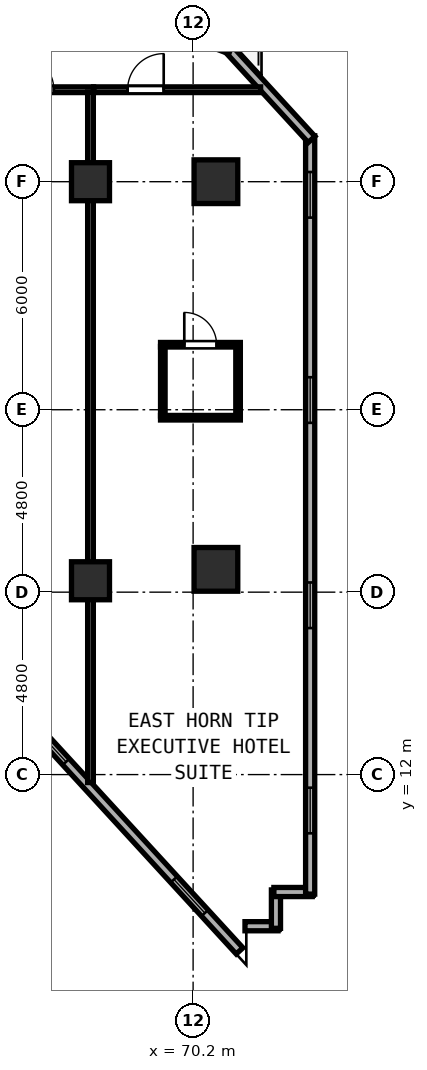
"""IFC4 building model, lengths in metres.
Left out: names, types, materials, properties, quantities, classifications, styles, units other than length and angle.
Written with IfcOpenShell. Run it as: python <this file> out.ifc"""

import sys

from ifc_helpers import new_model, si_unit, direction, frame, frame_2d, origin, origin_2d, place, context, subcontext, project, spatial, rectangle, hollow_rectangle, extrude, element, fill, save


model = new_model("IFC4")
c1 = context("Model", 3, precision=1e-05, world=origin(), true_north=direction((0.0, 1.0)))
c2 = subcontext(c1, "Body", "Model", "MODEL_VIEW")
j1 = project(units=[si_unit("LENGTHUNIT", "METRE"), si_unit("PLANEANGLEUNIT", "RADIAN")], contexts=[c1])
p1 = place(None, origin())
s1 = spatial("IfcSite", under=j1, at=p1, CompositionType="ELEMENT")
p2 = place(p1, origin())
s2 = spatial("IfcBuilding", under=s1, at=p2, CompositionType="ELEMENT")
p3 = place(p2, frame((0.0, 0.0, 24.0)))
s3 = spatial("IfcBuildingStorey", under=s2, at=p3, CompositionType="ELEMENT", Elevation=24.0)
for number, where, z_axis, x_axis in (
    (1, (70.8, 17.4, 0.0), (0.0, 0.0, 1.0), (1.0, 0.0, 0.0)),
    (2, (70.8, 27.6, 0.0), (0.0, 0.0, 1.0), (1.0, 0.0, 0.0)),
):
    element("IfcColumn", number, at=place(p3, frame(where, z_axis=z_axis, x_axis=x_axis)), inside=s3, PredefinedType="COLUMN", context=c2, shape_type="SweptSolid", body=[
        extrude(hollow_rectangle(XDim=1.15, YDim=1.15, WallThickness=0.042, at=origin_2d()), origin(), (0.0, 0.0, 1.0), 3.8),
    ])
for number, where, z_axis, x_axis in (
    (3, (67.5, 17.1, -0.26), (0.0, 0.0, 1.0), (1.0, 0.0, 0.0)),
    (4, (67.5, 27.6, -0.26), (0.0, 0.0, 1.0), (1.0, 0.0, 0.0)),
):
    element("IfcColumn", number, at=place(p3, frame(where, z_axis=z_axis, x_axis=x_axis)), inside=s3, PredefinedType="COLUMN", context=c2, shape_type="SweptSolid", body=[
        extrude(hollow_rectangle(XDim=1.0, YDim=1.0, WallThickness=0.038, at=origin_2d()), origin(), (0.0, 0.0, 1.0), 4.06),
    ])
p4 = place(p3, frame((64.964, 14.399, 0.0), z_axis=(0.0, 0.0, 1.0), x_axis=(0.676144639244, -0.736768910054, 0.0)))
e5 = element("IfcWall", 5, at=p4, inside=s3, PredefinedType="SOLIDWALL", context=c2, shape_type="SweptSolid", body=[
    extrude(rectangle(XDim=9.552, YDim=0.24, at=frame_2d((4.776, 0.0))), origin(), (0.0, 0.0, 1.0), 3.6),
])
p5 = place(p4, frame((1.6, 0.0, 0.85)))
e6 = element("IfcOpeningElement", 6, at=p5, cuts=e5, PredefinedType="OPENING", context=c2, shape_type="SweptSolid", body=[
    extrude(rectangle(XDim=1.2, YDim=1.85, at=frame_2d((0.6, 0.925))), frame((0.0, 0.13, 0.0), z_axis=(0.0, -1.0, 0.0), x_axis=(1.0, 0.0, 0.0)), (0.0, 0.0, 1.0), 0.26),
])
p6 = place(p4, frame((7.0, 0.0, 0.85)))
e7 = element("IfcOpeningElement", 7, at=p6, cuts=e5, PredefinedType="OPENING", context=c2, shape_type="SweptSolid", body=[
    extrude(rectangle(XDim=1.2, YDim=1.85, at=frame_2d((0.6, 0.925))), frame((0.0, 0.13, 0.0), z_axis=(0.0, -1.0, 0.0), x_axis=(1.0, 0.0, 0.0)), (0.0, 0.0, 1.0), 0.26),
])
p7 = place(p3, frame((71.565, 8.01, 0.0), z_axis=(0.0, 0.0, 1.0), x_axis=(1.0, 0.0, 0.0)))
e8 = element("IfcWall", 8, at=p7, inside=s3, PredefinedType="SOLIDWALL", context=c2, shape_type="SweptSolid", body=[
    extrude(rectangle(XDim=0.87, YDim=0.24, at=frame_2d((0.435, 0.0))), origin(), (0.0, 0.0, 1.0), 3.6),
])
for number, where, z_axis, x_axis in (
    (9, (72.38, 7.955, 0.0), (0.0, 0.0, 1.0), (0.0, 1.0, 0.0)),
    (10, (72.325, 8.91, 0.0), (0.0, 0.0, 1.0), (1.0, 0.0, 0.0)),
):
    element("IfcWall", number, at=place(p3, frame(where, z_axis=z_axis, x_axis=x_axis)), inside=s3, PredefinedType="SOLIDWALL", context=c2, shape_type="SweptSolid", body=[
        extrude(rectangle(XDim=1.01, YDim=0.24, at=frame_2d((0.505, 0.0))), origin(), (0.0, 0.0, 1.0), 3.6),
    ])
p8 = place(p3, frame((73.28, 8.855, 0.0), z_axis=(0.0, 0.0, 1.0), x_axis=(0.0, 1.0, 0.0)))
e11 = element("IfcWall", 11, at=p8, inside=s3, PredefinedType="SOLIDWALL", context=c2, shape_type="SweptSolid", body=[
    extrude(rectangle(XDim=19.953, YDim=0.24, at=frame_2d((9.977, 0.0))), origin(), (0.0, 0.0, 1.0), 3.6),
])
p9 = place(p8, frame((1.6, 0.0, 0.85)))
e12 = element("IfcOpeningElement", 12, at=p9, cuts=e11, PredefinedType="OPENING", context=c2, shape_type="SweptSolid", body=[
    extrude(rectangle(XDim=1.2, YDim=1.85, at=frame_2d((0.6, 0.925))), frame((0.0, 0.13, 0.0), z_axis=(0.0, -1.0, 0.0), x_axis=(1.0, 0.0, 0.0)), (0.0, 0.0, 1.0), 0.26),
])
p10 = place(p8, frame((7.0, 0.0, 0.85)))
e13 = element("IfcOpeningElement", 13, at=p10, cuts=e11, PredefinedType="OPENING", context=c2, shape_type="SweptSolid", body=[
    extrude(rectangle(XDim=1.2, YDim=1.85, at=frame_2d((0.6, 0.925))), frame((0.0, 0.13, 0.0), z_axis=(0.0, -1.0, 0.0), x_axis=(1.0, 0.0, 0.0)), (0.0, 0.0, 1.0), 0.26),
])
p11 = place(p8, frame((12.4, 0.0, 0.85)))
e14 = element("IfcOpeningElement", 14, at=p11, cuts=e11, PredefinedType="OPENING", context=c2, shape_type="SweptSolid", body=[
    extrude(rectangle(XDim=1.2, YDim=1.85, at=frame_2d((0.6, 0.925))), frame((0.0, 0.13, 0.0), z_axis=(0.0, -1.0, 0.0), x_axis=(1.0, 0.0, 0.0)), (0.0, 0.0, 1.0), 0.26),
])
p12 = place(p8, frame((17.8, 0.0, 0.85)))
e15 = element("IfcOpeningElement", 15, at=p12, cuts=e11, PredefinedType="OPENING", context=c2, shape_type="SweptSolid", body=[
    extrude(rectangle(XDim=1.2, YDim=1.85, at=frame_2d((0.6, 0.925))), frame((0.0, 0.13, 0.0), z_axis=(0.0, -1.0, 0.0), x_axis=(1.0, 0.0, 0.0)), (0.0, 0.0, 1.0), 0.26),
])
p13 = place(p3, frame((73.317, 28.713, 0.0), z_axis=(0.0, 0.0, 1.0), x_axis=(-0.675758228752, 0.737123338577, 0.0)))
e16 = element("IfcWall", 16, at=p13, inside=s3, PredefinedType="SOLIDWALL", context=c2, shape_type="SweptSolid", body=[
    extrude(rectangle(XDim=3.29, YDim=0.24, at=frame_2d((1.645, 0.0))), origin(), (0.0, 0.0, 1.0), 3.6),
])
p14 = place(p3, frame((71.183, 31.078, 0.0), z_axis=(0.0, 0.0, 1.0), x_axis=(-0.936332044214, 0.351115797106, 0.0)))
e17 = element("IfcWall", 17, at=p14, inside=s3, PredefinedType="SOLIDWALL", context=c2, shape_type="SweptSolid", body=[
    extrude(rectangle(XDim=7.0, YDim=0.24, at=frame_2d((3.5, 0.0))), origin(), (0.0, 0.0, 1.0), 3.6),
])
p15 = place(p14, frame((1.6, 0.0, 0.85)))
e18 = element("IfcOpeningElement", 18, at=p15, cuts=e17, PredefinedType="OPENING", context=c2, shape_type="SweptSolid", body=[
    extrude(rectangle(XDim=1.2, YDim=1.85, at=frame_2d((0.6, 0.925))), frame((0.0, 0.13, 0.0), z_axis=(0.0, -1.0, 0.0), x_axis=(1.0, 0.0, 0.0)), (0.0, 0.0, 1.0), 0.26),
])
p16 = place(p3, frame((64.7, 30.02, 0.0), z_axis=(0.0, 0.0, 1.0), x_axis=(1.0, 0.0, 0.0)))
e19 = element("IfcWall", 19, at=p16, inside=s3, PredefinedType="PARTITIONING", context=c2, shape_type="SweptSolid", body=[
    extrude(rectangle(XDim=2.88, YDim=0.15, at=frame_2d((1.44, 0.0))), origin(), (0.0, 0.0, 1.0), 3.6),
])
p17 = place(p16, frame((1.835, 0.0, 0.0), z_axis=(0.0, 0.0, 1.0), x_axis=(-1.0, 0.0, 0.0)))
e20 = element("IfcOpeningElement", 20, at=p17, cuts=e19, PredefinedType="OPENING", context=c2, shape_type="SweptSolid", body=[
    extrude(rectangle(XDim=0.95, YDim=2.12, at=frame_2d((0.475, 1.06))), frame((0.0, 0.085, 0.0), z_axis=(0.0, -1.0, 0.0), x_axis=(1.0, 0.0, 0.0)), (0.0, 0.0, 1.0), 0.17),
])
p18 = place(p3, frame((67.5, 11.791, 0.0), z_axis=(0.0, 0.0, 1.0), x_axis=(0.0, 1.0, 0.0)))
e21 = element("IfcWall", 21, at=p18, inside=s3, PredefinedType="PARTITIONING", context=c2, shape_type="SweptSolid", body=[
    extrude(rectangle(XDim=18.169, YDim=0.15, at=frame_2d((9.085, 0.0))), origin(), (0.0, 0.0, 1.0), 3.6),
])
p19 = place(p3, frame((67.582, 30.02, 0.0), z_axis=(0.0, 0.0, 1.0), x_axis=(1.0, 0.0, 0.0)))
e22 = element("IfcWall", 22, at=p19, inside=s3, PredefinedType="PARTITIONING", context=c2, shape_type="SweptSolid", body=[
    extrude(rectangle(XDim=4.394, YDim=0.15, at=frame_2d((2.197, 0.0))), origin(), (0.0, 0.0, 1.0), 3.6),
])
p20 = place(p19, frame((1.844, 0.0, 0.0), z_axis=(0.0, 0.0, 1.0), x_axis=(-1.0, 0.0, 0.0)))
e23 = element("IfcOpeningElement", 23, at=p20, cuts=e22, PredefinedType="OPENING", context=c2, shape_type="SweptSolid", body=[
    extrude(rectangle(XDim=0.95, YDim=2.18, at=frame_2d((0.475, 1.09))), frame((0.0, 0.085, 0.0), z_axis=(0.0, -1.0, 0.0), x_axis=(1.0, 0.0, 0.0)), (0.0, 0.0, 1.0), 0.17),
])
p21 = place(p3, frame((69.343, 23.31, 0.0), z_axis=(0.0, 0.0, 1.0), x_axis=(1.0, 0.0, 0.0)))
e24 = element("IfcWall", 24, at=p21, inside=s3, PredefinedType="PARTITIONING", context=c2, shape_type="SweptSolid", body=[
    extrude(rectangle(XDim=2.1, YDim=0.12, at=frame_2d((1.05, 0.0))), origin(), (0.0, 0.0, 1.0), 3.6),
])
p22 = place(p21, frame((1.475, 0.0, 0.0), z_axis=(0.0, 0.0, 1.0), x_axis=(-1.0, 0.0, 0.0)))
e25 = element("IfcOpeningElement", 25, at=p22, cuts=e24, PredefinedType="OPENING", context=c2, shape_type="SweptSolid", body=[
    extrude(rectangle(XDim=0.85, YDim=2.1, at=frame_2d((0.425, 1.05))), frame((0.0, 0.07, 0.0), z_axis=(0.0, -1.0, 0.0), x_axis=(1.0, 0.0, 0.0)), (0.0, 0.0, 1.0), 0.14),
])
p23 = place(p3, frame((69.343, 21.39, 0.0), z_axis=(0.0, 0.0, 1.0), x_axis=(1.0, 0.0, 0.0)))
e26 = element("IfcWall", 26, at=p23, inside=s3, PredefinedType="PARTITIONING", context=c2, shape_type="SweptSolid", body=[
    extrude(rectangle(XDim=2.1, YDim=0.12, at=frame_2d((1.05, 0.0))), origin(), (0.0, 0.0, 1.0), 3.6),
])
for number, where, z_axis, x_axis in (
    (27, (69.403, 21.435, 0.0), (0.0, 0.0, 1.0), (0.0, 1.0, 0.0)),
    (28, (71.383, 21.435, 0.0), (0.0, 0.0, 1.0), (0.0, 1.0, 0.0)),
):
    element("IfcWall", number, at=place(p3, frame(where, z_axis=z_axis, x_axis=x_axis)), inside=s3, PredefinedType="PARTITIONING", context=c2, shape_type="SweptSolid", body=[
        extrude(rectangle(XDim=1.83, YDim=0.12, at=frame_2d((0.915, 0.0))), origin(), (0.0, 0.0, 1.0), 3.6),
    ])
p24 = place(p5, origin())
e29 = element("IfcWindow", 29, at=p24, inside=s3, PartitioningType="SINGLE_PANEL", PredefinedType="WINDOW", context=c2, shape_type="SweptSolid", body=[
    extrude(rectangle(XDim=1.2, YDim=1.85, at=frame_2d((0.6, 0.925))), frame((0.0, 0.03, 0.0), z_axis=(0.0, -1.0, 0.0), x_axis=(1.0, 0.0, 0.0)), (0.0, 0.0, 1.0), 0.06),
])
fill(e6, e29)
p25 = place(p6, origin())
e30 = element("IfcWindow", 30, at=p25, inside=s3, PartitioningType="SINGLE_PANEL", PredefinedType="WINDOW", context=c2, shape_type="SweptSolid", body=[
    extrude(rectangle(XDim=1.2, YDim=1.85, at=frame_2d((0.6, 0.925))), frame((0.0, 0.03, 0.0), z_axis=(0.0, -1.0, 0.0), x_axis=(1.0, 0.0, 0.0)), (0.0, 0.0, 1.0), 0.06),
])
fill(e7, e30)
p26 = place(p9, origin())
e31 = element("IfcWindow", 31, at=p26, inside=s3, PartitioningType="SINGLE_PANEL", PredefinedType="WINDOW", context=c2, shape_type="SweptSolid", body=[
    extrude(rectangle(XDim=1.2, YDim=1.85, at=frame_2d((0.6, 0.925))), frame((0.0, 0.03, 0.0), z_axis=(0.0, -1.0, 0.0), x_axis=(1.0, 0.0, 0.0)), (0.0, 0.0, 1.0), 0.06),
])
fill(e12, e31)
p27 = place(p10, origin())
e32 = element("IfcWindow", 32, at=p27, inside=s3, PartitioningType="SINGLE_PANEL", PredefinedType="WINDOW", context=c2, shape_type="SweptSolid", body=[
    extrude(rectangle(XDim=1.2, YDim=1.85, at=frame_2d((0.6, 0.925))), frame((0.0, 0.03, 0.0), z_axis=(0.0, -1.0, 0.0), x_axis=(1.0, 0.0, 0.0)), (0.0, 0.0, 1.0), 0.06),
])
fill(e13, e32)
p28 = place(p11, origin())
e33 = element("IfcWindow", 33, at=p28, inside=s3, PartitioningType="SINGLE_PANEL", PredefinedType="WINDOW", context=c2, shape_type="SweptSolid", body=[
    extrude(rectangle(XDim=1.2, YDim=1.85, at=frame_2d((0.6, 0.925))), frame((0.0, 0.03, 0.0), z_axis=(0.0, -1.0, 0.0), x_axis=(1.0, 0.0, 0.0)), (0.0, 0.0, 1.0), 0.06),
])
fill(e14, e33)
p29 = place(p12, origin())
e34 = element("IfcWindow", 34, at=p29, inside=s3, PartitioningType="SINGLE_PANEL", PredefinedType="WINDOW", context=c2, shape_type="SweptSolid", body=[
    extrude(rectangle(XDim=1.2, YDim=1.85, at=frame_2d((0.6, 0.925))), frame((0.0, 0.03, 0.0), z_axis=(0.0, -1.0, 0.0), x_axis=(1.0, 0.0, 0.0)), (0.0, 0.0, 1.0), 0.06),
])
fill(e15, e34)
p30 = place(p17, origin())
e35 = element("IfcDoor", 35, at=p30, inside=s3, OperationType="SINGLE_SWING_RIGHT", PredefinedType="DOOR", context=c2, shape_type="SweptSolid", body=[
    extrude(rectangle(XDim=0.95, YDim=2.12, at=frame_2d((0.475, 1.06))), frame((0.0, 0.025, 0.0), z_axis=(0.0, -1.0, 0.0), x_axis=(1.0, 0.0, 0.0)), (0.0, 0.0, 1.0), 0.05),
])
fill(e20, e35)
p31 = place(p20, origin())
e36 = element("IfcDoor", 36, at=p31, inside=s3, OperationType="SINGLE_SWING_LEFT", PredefinedType="DOOR", context=c2, shape_type="SweptSolid", body=[
    extrude(rectangle(XDim=0.95, YDim=2.18, at=frame_2d((0.475, 1.09))), frame((0.0, 0.025, 0.0), z_axis=(0.0, -1.0, 0.0), x_axis=(1.0, 0.0, 0.0)), (0.0, 0.0, 1.0), 0.05),
])
fill(e23, e36)
p32 = place(p22, origin())
e37 = element("IfcDoor", 37, at=p32, inside=s3, OperationType="SINGLE_SWING_RIGHT", PredefinedType="DOOR", context=c2, shape_type="SweptSolid", body=[
    extrude(rectangle(XDim=0.85, YDim=2.1, at=frame_2d((0.425, 1.05))), frame((0.0, 0.025, 0.0), z_axis=(0.0, -1.0, 0.0), x_axis=(1.0, 0.0, 0.0)), (0.0, 0.0, 1.0), 0.05),
])
fill(e25, e37)
save(model, sys.argv[1])
